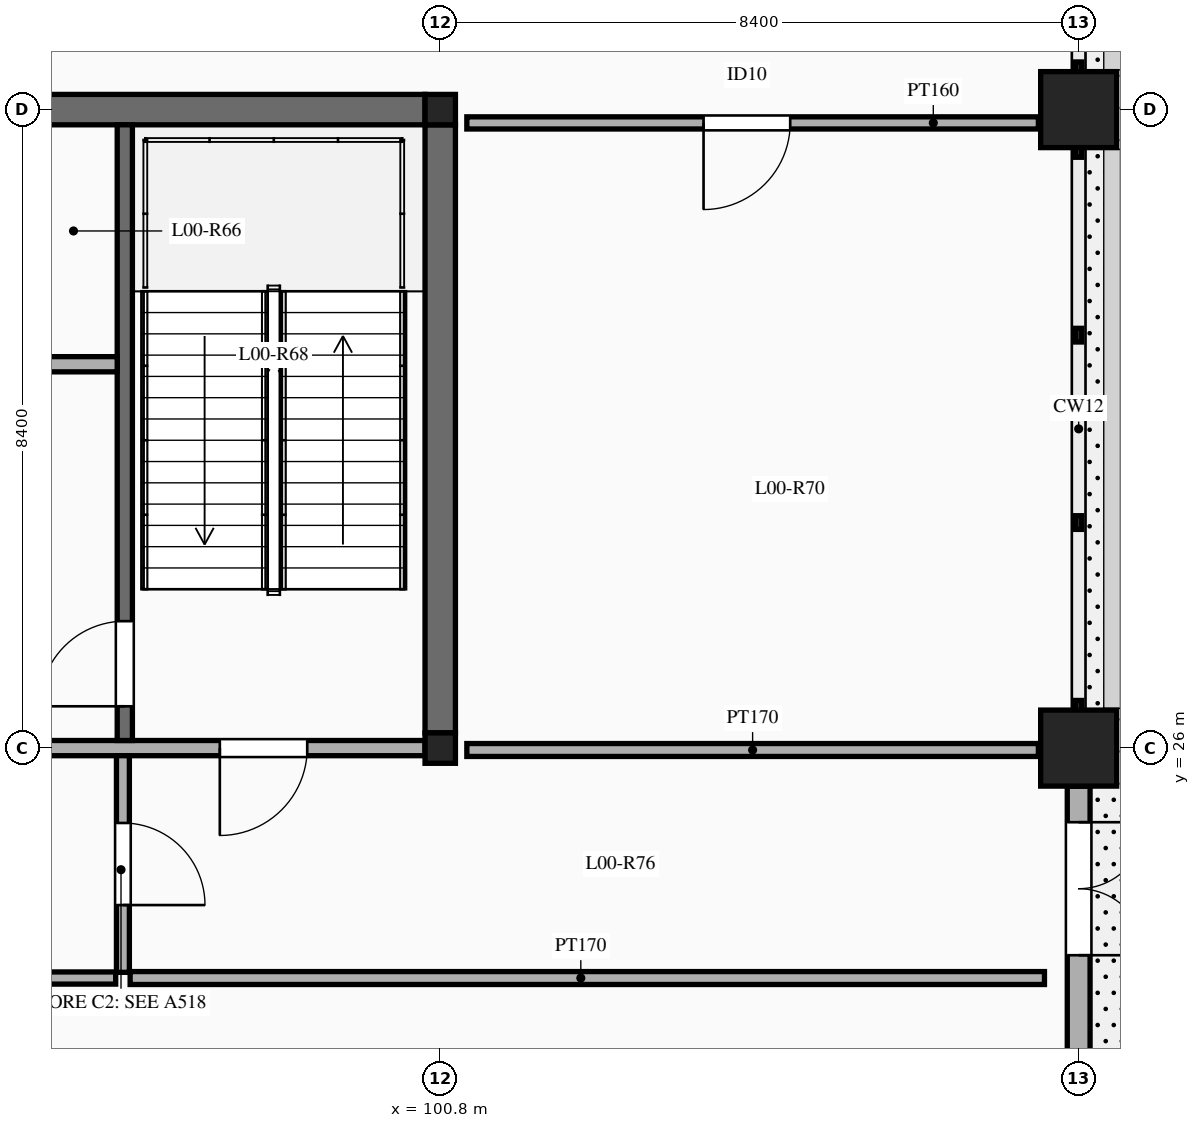
"""IFC4 building model, lengths in metres.
Left out: names, types, materials, properties, quantities, classifications, styles, units other than length and angle.
Written with IfcOpenShell. Run it as: python <this file> out.ifc"""

import sys

from ifc_helpers import new_model, si_unit, direction, frame, frame_2d, origin, origin_2d, place, context, subcontext, project, spatial, rectangle, extrude, element, fill, save


model = new_model("IFC4")
c1 = context("Model", 3, precision=1e-05, world=origin(), true_north=direction((0.0, 1.0)))
c2 = subcontext(c1, "Body", "Model", "MODEL_VIEW")
j1 = project(units=[si_unit("LENGTHUNIT", "METRE"), si_unit("PLANEANGLEUNIT", "RADIAN")], contexts=[c1])
p1 = place(None, origin())
s1 = spatial("IfcSite", under=j1, at=p1, CompositionType="ELEMENT")
p2 = place(p1, origin())
s2 = spatial("IfcBuilding", under=s1, at=p2, CompositionType="ELEMENT")
p3 = place(p2, origin())
s3 = spatial("IfcBuildingStorey", under=s2, at=p3, CompositionType="ELEMENT", Elevation=0.0)
for number, where, z_axis, x_axis in (
    (1, (100.8, 26.0, 0.0), (0.0, 0.0, 1.0), (1.0, 0.0, 0.0)),
    (2, (100.8, 34.4, 0.0), (0.0, 0.0, 1.0), (1.0, 0.0, 0.0)),
):
    element("IfcColumn", number, at=place(p3, frame(where, z_axis=z_axis, x_axis=x_axis)), inside=s3, PredefinedType="COLUMN", context=c2, shape_type="SweptSolid", body=[
        extrude(rectangle(XDim=0.4, YDim=0.4, at=origin_2d()), origin(), (0.0, 0.0, 1.0), 5.4),
    ])
for number, where, z_axis, x_axis in (
    (3, (109.2, 26.0, 0.0), (0.0, 0.0, 1.0), (1.0, 0.0, 0.0)),
    (4, (109.2, 34.4, 0.0), (0.0, 0.0, 1.0), (1.0, 0.0, 0.0)),
):
    element("IfcColumn", number, at=place(p3, frame(where, z_axis=z_axis, x_axis=x_axis)), inside=s3, PredefinedType="COLUMN", context=c2, shape_type="SweptSolid", body=[
        extrude(rectangle(XDim=1.0, YDim=1.0, at=origin_2d()), origin(), (0.0, 0.0, 1.0), 5.4),
    ])
for number, where, z_axis, x_axis in (
    (5, (100.8, 26.2, 0.0), (0.0, 0.0, 1.0), (0.0, 1.0, 0.0)),
    (6, (92.6, 34.4, 0.0), (0.0, 0.0, 1.0), (1.0, 0.0, 0.0)),
):
    element("IfcWall", number, at=place(p3, frame(where, z_axis=z_axis, x_axis=x_axis)), inside=s3, PredefinedType="SHEAR", context=c2, shape_type="SweptSolid", body=[
        extrude(rectangle(XDim=8.0, YDim=0.4, at=frame_2d((4.0, 0.0))), origin(), (0.0, 0.0, 1.0), 5.4),
    ])
p4 = place(p3, frame((109.2, 18.102, 0.0), z_axis=(0.0, 0.0, 1.0), x_axis=(0.0, 1.0, 0.0)))
e7 = element("IfcWall", 7, at=p4, inside=s3, PredefinedType="SOLIDWALL", context=c2, shape_type="SweptSolid", body=[
    extrude(rectangle(XDim=7.396, YDim=0.3, at=frame_2d((3.698, 0.0))), origin(), (0.0, 0.0, 1.0), 4.45),
])
p5 = place(p4, frame((5.173, 0.0, 0.0)))
e8 = element("IfcOpeningElement", 8, at=p5, cuts=e7, PredefinedType="OPENING", context=c2, shape_type="SweptSolid", body=[
    extrude(rectangle(XDim=1.75, YDim=2.35, at=frame_2d((0.875, 1.175))), frame((0.0, 0.16, 0.0), z_axis=(0.0, -1.0, 0.0), x_axis=(1.0, 0.0, 0.0)), (0.0, 0.0, 1.0), 0.32),
])
p6 = place(p4, frame((1.049, 0.0, 0.9)))
e9 = element("IfcOpeningElement", 9, at=p6, cuts=e7, PredefinedType="OPENING", context=c2, shape_type="SweptSolid", body=[
    extrude(rectangle(XDim=1.6, YDim=2.1, at=frame_2d((0.8, 1.05))), frame((0.0, 0.16, 0.0), z_axis=(0.0, -1.0, 0.0), x_axis=(1.0, 0.0, 0.0)), (0.0, 0.0, 1.0), 0.32),
])
p7 = place(p3, frame((92.6, 26.0, 0.0), z_axis=(0.0, 0.0, 1.0), x_axis=(1.0, 0.0, 0.0)))
e10 = element("IfcWall", 10, at=p7, inside=s3, PredefinedType="SOLIDWALL", context=c2, shape_type="SweptSolid", body=[
    extrude(rectangle(XDim=8.0, YDim=0.2, at=frame_2d((4.0, 0.0))), origin(), (0.0, 0.0, 1.0), 4.53),
])
p8 = place(p7, frame((1.4, 0.0, 0.0)))
e11 = element("IfcOpeningElement", 11, at=p8, cuts=e10, PredefinedType="OPENING", context=c2, shape_type="SweptSolid", body=[
    extrude(rectangle(XDim=1.22, YDim=2.15, at=frame_2d((0.61, 1.075))), frame((0.0, 0.11, 0.0), z_axis=(0.0, -1.0, 0.0), x_axis=(1.0, 0.0, 0.0)), (0.0, 0.0, 1.0), 0.22),
])
p9 = place(p7, frame((5.3, 0.0, 0.0)))
e12 = element("IfcOpeningElement", 12, at=p9, cuts=e10, PredefinedType="OPENING", context=c2, shape_type="SweptSolid", body=[
    extrude(rectangle(XDim=1.15, YDim=2.15, at=frame_2d((0.575, 1.075))), frame((0.0, 0.11, 0.0), z_axis=(0.0, -1.0, 0.0), x_axis=(1.0, 0.0, 0.0)), (0.0, 0.0, 1.0), 0.22),
])
p10 = place(p3, frame((96.65, 26.1, 0.0), z_axis=(0.0, 0.0, 1.0), x_axis=(0.0, 1.0, 0.0)))
e13 = element("IfcWall", 13, at=p10, inside=s3, PredefinedType="SOLIDWALL", context=c2, shape_type="SweptSolid", body=[
    extrude(rectangle(XDim=8.1, YDim=0.2, at=frame_2d((4.05, 0.0))), origin(), (0.0, 0.0, 1.0), 5.2),
])
p11 = place(p10, frame((0.45, 0.0, 0.0)))
e14 = element("IfcOpeningElement", 14, at=p11, cuts=e13, PredefinedType="OPENING", context=c2, shape_type="SweptSolid", body=[
    extrude(rectangle(XDim=1.12, YDim=2.15, at=frame_2d((0.56, 1.075))), frame((0.0, 0.11, 0.0), z_axis=(0.0, -1.0, 0.0), x_axis=(1.0, 0.0, 0.0)), (0.0, 0.0, 1.0), 0.22),
])
p12 = place(p3, frame((92.6, 31.05, 0.0), z_axis=(0.0, 0.0, 1.0), x_axis=(1.0, 0.0, 0.0)))
e15 = element("IfcWall", 15, at=p12, inside=s3, PredefinedType="SOLIDWALL", context=c2, shape_type="SweptSolid", body=[
    extrude(rectangle(XDim=3.95, YDim=0.2, at=frame_2d((1.975, 0.0))), origin(), (0.0, 0.0, 1.0), 5.2),
])
p13 = place(p12, frame((1.25, 0.0, 0.0)))
e16 = element("IfcOpeningElement", 16, at=p13, cuts=e15, PredefinedType="OPENING", context=c2, shape_type="SweptSolid", body=[
    extrude(rectangle(XDim=1.1, YDim=2.15, at=frame_2d((0.55, 1.075))), frame((0.0, 0.11, 0.0), z_axis=(0.0, -1.0, 0.0), x_axis=(1.0, 0.0, 0.0)), (0.0, 0.0, 1.0), 0.22),
])
p14 = place(p3, frame((101.15, 25.975, 0.0), z_axis=(0.0, 0.0, 1.0), x_axis=(1.0, 0.0, 0.0)))
e17 = element("IfcWall", 17, at=p14, inside=s3, PredefinedType="PARTITIONING", context=c2, shape_type="SweptSolid", body=[
    extrude(rectangle(XDim=7.52, YDim=0.17, at=frame_2d((3.76, 0.0))), origin(), (0.0, 0.0, 1.0), 4.35),
])
p15 = place(p3, frame((101.15, 34.225, 0.0), z_axis=(0.0, 0.0, 1.0), x_axis=(1.0, 0.0, 0.0)))
e18 = element("IfcWall", 18, at=p15, inside=s3, PredefinedType="PARTITIONING", context=c2, shape_type="SweptSolid", body=[
    extrude(rectangle(XDim=7.52, YDim=0.16, at=frame_2d((3.76, 0.0))), origin(), (0.0, 0.0, 1.0), 4.35),
])
p16 = place(p15, frame((3.115, 0.0, 0.0)))
e19 = element("IfcOpeningElement", 19, at=p16, cuts=e18, PredefinedType="OPENING", context=c2, shape_type="SweptSolid", body=[
    extrude(rectangle(XDim=1.14, YDim=2.22, at=frame_2d((0.57, 1.11))), frame((0.0, 0.09, 0.0), z_axis=(0.0, -1.0, 0.0), x_axis=(1.0, 0.0, 0.0)), (0.0, 0.0, 1.0), 0.18),
])
p17 = place(p3, frame((96.625, 23.05, 0.0), z_axis=(0.0, 0.0, 1.0), x_axis=(0.0, 1.0, 0.0)))
e20 = element("IfcWall", 20, at=p17, inside=s3, PredefinedType="PARTITIONING", context=c2, shape_type="SweptSolid", body=[
    extrude(rectangle(XDim=2.85, YDim=0.17, at=frame_2d((1.425, 0.0))), origin(), (0.0, 0.0, 1.0), 4.35),
])
p18 = place(p17, frame((0.885, 0.0, 0.0)))
e21 = element("IfcOpeningElement", 21, at=p18, cuts=e20, PredefinedType="OPENING", context=c2, shape_type="SweptSolid", body=[
    extrude(rectangle(XDim=1.08, YDim=2.15, at=frame_2d((0.54, 1.075))), frame((0.0, 0.095, 0.0), z_axis=(0.0, -1.0, 0.0), x_axis=(1.0, 0.0, 0.0)), (0.0, 0.0, 1.0), 0.19),
])
p19 = place(p3, frame((88.41, 22.975, 0.0), z_axis=(0.0, 0.0, 1.0), x_axis=(1.0, 0.0, 0.0)))
e22 = element("IfcWall", 22, at=p19, inside=s3, PredefinedType="PARTITIONING", context=c2, shape_type="SweptSolid", body=[
    extrude(rectangle(XDim=8.12, YDim=0.16, at=frame_2d((4.06, 0.0))), origin(), (0.0, 0.0, 1.0), 4.35),
])
p20 = place(p3, frame((96.72, 22.975, 0.0), z_axis=(0.0, 0.0, 1.0), x_axis=(1.0, 0.0, 0.0)))
e23 = element("IfcWall", 23, at=p20, inside=s3, PredefinedType="PARTITIONING", context=c2, shape_type="SweptSolid", body=[
    extrude(rectangle(XDim=12.03, YDim=0.17, at=frame_2d((6.015, 0.0))), origin(), (0.0, 0.0, 1.0), 4.35),
])
p21 = place(p5, frame((1.75, 0.0, 0.0), z_axis=(0.0, 0.0, 1.0), x_axis=(-1.0, 0.0, 0.0)))
e24 = element("IfcDoor", 24, at=p21, inside=s3, OperationType="DOUBLE_DOOR_SINGLE_SWING", PredefinedType="DOOR", context=c2, shape_type="SweptSolid", body=[
    extrude(rectangle(XDim=1.75, YDim=2.35, at=frame_2d((0.875, 1.175))), frame((0.0, 0.025, 0.0), z_axis=(0.0, -1.0, 0.0), x_axis=(1.0, 0.0, 0.0)), (0.0, 0.0, 1.0), 0.05),
])
fill(e8, e24)
p22 = place(p9, frame((1.15, 0.0, 0.0), z_axis=(0.0, 0.0, 1.0), x_axis=(-1.0, 0.0, 0.0)))
e25 = element("IfcDoor", 25, at=p22, inside=s3, OperationType="SINGLE_SWING_RIGHT", PredefinedType="DOOR", context=c2, shape_type="SweptSolid", body=[
    extrude(rectangle(XDim=1.15, YDim=2.15, at=frame_2d((0.575, 1.075))), frame((0.0, 0.025, 0.0), z_axis=(0.0, -1.0, 0.0), x_axis=(1.0, 0.0, 0.0)), (0.0, 0.0, 1.0), 0.05),
])
fill(e12, e25)
p23 = place(p11, origin())
e26 = element("IfcDoor", 26, at=p23, inside=s3, OperationType="SINGLE_SWING_LEFT", PredefinedType="DOOR", context=c2, shape_type="SweptSolid", body=[
    extrude(rectangle(XDim=1.12, YDim=2.15, at=frame_2d((0.56, 1.075))), frame((0.0, 0.025, 0.0), z_axis=(0.0, -1.0, 0.0), x_axis=(1.0, 0.0, 0.0)), (0.0, 0.0, 1.0), 0.05),
])
fill(e14, e26)
p24 = place(p16, frame((1.14, 0.0, 0.0), z_axis=(0.0, 0.0, 1.0), x_axis=(-1.0, 0.0, 0.0)))
e27 = element("IfcDoor", 27, at=p24, inside=s3, OperationType="SINGLE_SWING_RIGHT", PredefinedType="DOOR", context=c2, shape_type="SweptSolid", body=[
    extrude(rectangle(XDim=1.14, YDim=2.22, at=frame_2d((0.57, 1.11))), frame((0.0, 0.025, 0.0), z_axis=(0.0, -1.0, 0.0), x_axis=(1.0, 0.0, 0.0)), (0.0, 0.0, 1.0), 0.05),
])
fill(e19, e27)
p25 = place(p18, frame((1.08, 0.0, 0.0), z_axis=(0.0, 0.0, 1.0), x_axis=(-1.0, 0.0, 0.0)))
e28 = element("IfcDoor", 28, at=p25, inside=s3, OperationType="SINGLE_SWING_RIGHT", PredefinedType="DOOR", context=c2, shape_type="SweptSolid", body=[
    extrude(rectangle(XDim=1.08, YDim=2.15, at=frame_2d((0.54, 1.075))), frame((0.0, 0.025, 0.0), z_axis=(0.0, -1.0, 0.0), x_axis=(1.0, 0.0, 0.0)), (0.0, 0.0, 1.0), 0.05),
])
fill(e21, e28)
save(model, sys.argv[1])
